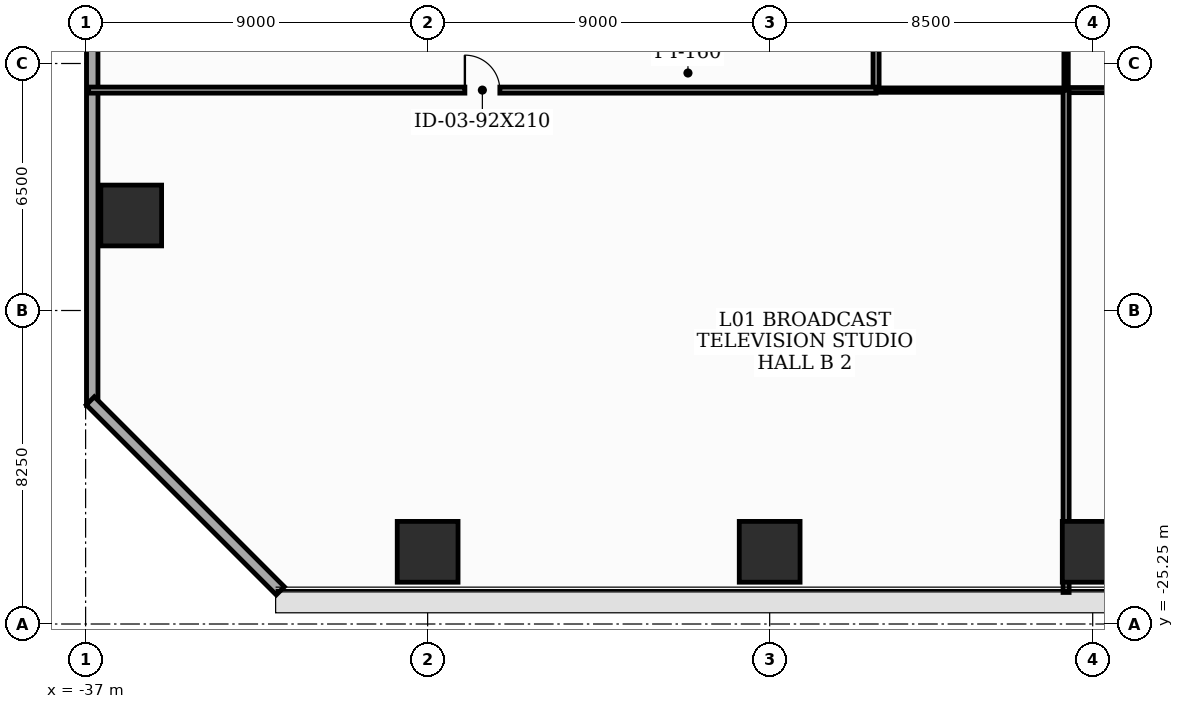
"""IFC4 building model, lengths in metres.
Left out: names, types, materials, properties, quantities, classifications, styles, units other than length and angle.
Written with IfcOpenShell. Run it as: python <this file> out.ifc"""

import sys

from ifc_helpers import new_model, si_unit, direction, frame, frame_2d, origin, origin_2d, place, context, subcontext, project, spatial, rectangle, extrude, element, fill, save


model = new_model("IFC4")
c1 = context("Model", 3, precision=1e-05, world=origin(), true_north=direction((0.0, 1.0)))
c2 = subcontext(c1, "Body", "Model", "MODEL_VIEW")
j1 = project(units=[si_unit("LENGTHUNIT", "METRE"), si_unit("PLANEANGLEUNIT", "RADIAN")], contexts=[c1])
p1 = place(None, origin())
s1 = spatial("IfcSite", under=j1, at=p1, CompositionType="ELEMENT")
p2 = place(p1, origin())
s2 = spatial("IfcBuilding", under=s1, at=p2, CompositionType="ELEMENT")
p3 = place(p2, frame((0.0, 0.0, 5.2)))
s3 = spatial("IfcBuildingStorey", under=s2, at=p3, CompositionType="ELEMENT", Elevation=5.2)
for number, where, z_axis, x_axis in (
    (1, (-28.0, -23.35, 0.0), (0.0, 0.0, 1.0), (1.0, 0.0, 0.0)),
    (2, (-19.0, -23.35, 0.0), (0.0, 0.0, 1.0), (1.0, 0.0, 0.0)),
    (3, (-10.5, -23.35, 0.0), (0.0, 0.0, 1.0), (1.0, 0.0, 0.0)),
    (4, (-35.8, -14.5, 0.0), (0.0, 0.0, 1.0), (1.0, 0.0, 0.0)),
):
    element("IfcColumn", number, at=place(p3, frame(where, z_axis=z_axis, x_axis=x_axis)), inside=s3, PredefinedType="COLUMN", context=c2, shape_type="SweptSolid", body=[
        extrude(rectangle(XDim=1.6, YDim=1.6, at=origin_2d()), origin(), (0.0, 0.0, 1.0), 5.2),
    ])
p4 = place(p3, frame((-36.825, 28.5, 0.0), z_axis=(0.0, 0.0, 1.0), x_axis=(0.0, -1.0, 0.0)))
e5 = element("IfcWall", 5, at=p4, inside=s3, PredefinedType="SOLIDWALL", context=c2, shape_type="SweptSolid", body=[
    extrude(rectangle(XDim=48.0, YDim=0.3, at=frame_2d((24.0, 0.0))), origin(), (0.0, 0.0, 1.0), 4.95),
])
p5 = place(p4, frame((6.2, 0.0, 0.9)))
e6 = element("IfcOpeningElement", 6, at=p5, cuts=e5, PredefinedType="OPENING", context=c2, shape_type="SweptSolid", body=[
    extrude(rectangle(XDim=2.4, YDim=1.35, at=frame_2d((1.2, 0.675))), frame((0.0, 0.16, 0.0), z_axis=(0.0, -1.0, 0.0), x_axis=(1.0, 0.0, 0.0)), (0.0, 0.0, 1.0), 0.32),
])
p6 = place(p4, frame((19.2, 0.0, 0.9)))
e7 = element("IfcOpeningElement", 7, at=p6, cuts=e5, PredefinedType="OPENING", context=c2, shape_type="SweptSolid", body=[
    extrude(rectangle(XDim=1.8, YDim=1.35, at=frame_2d((0.9, 0.675))), frame((0.0, 0.16, 0.0), z_axis=(0.0, -1.0, 0.0), x_axis=(1.0, 0.0, 0.0)), (0.0, 0.0, 1.0), 0.32),
])
p7 = place(p4, frame((36.2, 0.0, 0.9)))
e8 = element("IfcOpeningElement", 8, at=p7, cuts=e5, PredefinedType="OPENING", context=c2, shape_type="SweptSolid", body=[
    extrude(rectangle(XDim=2.4, YDim=1.35, at=frame_2d((1.2, 0.675))), frame((0.0, 0.16, 0.0), z_axis=(0.0, -1.0, 0.0), x_axis=(1.0, 0.0, 0.0)), (0.0, 0.0, 1.0), 0.32),
])
p8 = place(p3, frame((-36.876, -19.376, 0.0), z_axis=(0.0, 0.0, 1.0), x_axis=(0.707106781187, -0.707106781187, 0.0)))
e9 = element("IfcWall", 9, at=p8, inside=s3, PredefinedType="SOLIDWALL", context=c2, shape_type="SweptSolid", body=[
    extrude(rectangle(XDim=7.071, YDim=0.3, at=frame_2d((3.536, 0.0))), origin(), (0.0, 0.0, 1.0), 4.95),
])
p9 = place(p3, frame((-11.2, -7.4, 0.0), z_axis=(0.0, 0.0, 1.0), x_axis=(0.0, -1.0, 0.0)))
e10 = element("IfcWall", 10, at=p9, inside=s3, PredefinedType="PARTITIONING", context=c2, shape_type="SweptSolid", body=[
    extrude(rectangle(XDim=3.8, YDim=0.115, at=frame_2d((1.9, 0.0))), origin(), (0.0, 0.0, 1.0), 4.95),
])
p10 = place(p9, frame((1.44, 0.0, 0.0)))
e11 = element("IfcOpeningElement", 11, at=p10, cuts=e10, PredefinedType="OPENING", context=c2, shape_type="SweptSolid", body=[
    extrude(rectangle(XDim=0.92, YDim=2.1, at=frame_2d((0.46, 1.05))), frame((0.0, 0.067, 0.0), z_axis=(0.0, -1.0, 0.0), x_axis=(1.0, 0.0, 0.0)), (0.0, 0.0, 1.0), 0.135),
])
p11 = place(p3, frame((-11.2, -11.2, 0.0), z_axis=(0.0, 0.0, 1.0), x_axis=(1.0, 0.0, 0.0)))
e12 = element("IfcWall", 12, at=p11, inside=s3, PredefinedType="PARTITIONING", context=c2, shape_type="SweptSolid", body=[
    extrude(rectangle(XDim=22.4, YDim=0.135, at=frame_2d((11.2, 0.0))), origin(), (0.0, 0.0, 1.0), 3.435),
])
p12 = place(p11, frame((8.037, 0.0, 0.0)))
e13 = element("IfcOpeningElement", 13, at=p12, cuts=e12, PredefinedType="OPENING", context=c2, shape_type="SweptSolid", body=[
    extrude(rectangle(XDim=0.95, YDim=2.1, at=frame_2d((0.475, 1.05))), frame((0.0, 0.077, 0.0), z_axis=(0.0, -1.0, 0.0), x_axis=(1.0, 0.0, 0.0)), (0.0, 0.0, 1.0), 0.155),
])
p13 = place(p3, frame((-16.2, -11.2, 0.0), z_axis=(0.0, 0.0, 1.0), x_axis=(0.0, 1.0, 0.0)))
e14 = element("IfcWall", 14, at=p13, inside=s3, PredefinedType="PARTITIONING", context=c2, shape_type="SweptSolid", body=[
    extrude(rectangle(XDim=3.8, YDim=0.16, at=frame_2d((1.9, 0.0))), origin(), (0.0, 0.0, 1.0), 4.95),
])
p14 = place(p3, frame((-36.92, -11.2, 0.0), z_axis=(0.0, 0.0, 1.0), x_axis=(1.0, 0.0, 0.0)))
e15 = element("IfcWall", 15, at=p14, inside=s3, PredefinedType="PARTITIONING", context=c2, shape_type="SweptSolid", body=[
    extrude(rectangle(XDim=20.72, YDim=0.16, at=frame_2d((10.36, 0.0))), origin(), (0.0, 0.0, 1.0), 3.435),
])
p15 = place(p14, frame((9.9, 0.0, 0.0)))
e16 = element("IfcOpeningElement", 16, at=p15, cuts=e15, PredefinedType="OPENING", context=c2, shape_type="SweptSolid", body=[
    extrude(rectangle(XDim=0.92, YDim=2.1, at=frame_2d((0.46, 1.05))), frame((0.0, 0.09, 0.0), z_axis=(0.0, -1.0, 0.0), x_axis=(1.0, 0.0, 0.0)), (0.0, 0.0, 1.0), 0.18),
])
p16 = place(p3, frame((-16.2, -11.2, 0.0), z_axis=(0.0, 0.0, 1.0), x_axis=(1.0, 0.0, 0.0)))
e17 = element("IfcWall", 17, at=p16, inside=s3, PredefinedType="PARTITIONING", context=c2, shape_type="SweptSolid", body=[
    extrude(rectangle(XDim=5.0, YDim=0.115, at=frame_2d((2.5, 0.0))), origin(), (0.0, 0.0, 1.0), 4.95),
])
p17 = place(p3, frame((-11.2, -24.42, 0.0), z_axis=(0.0, 0.0, 1.0), x_axis=(0.0, 1.0, 0.0)))
e18 = element("IfcWall", 18, at=p17, inside=s3, PredefinedType="PARTITIONING", context=c2, shape_type="SweptSolid", body=[
    extrude(rectangle(XDim=13.22, YDim=0.16, at=frame_2d((6.61, 0.0))), origin(), (0.0, 0.0, 1.0), 3.435),
])
p18 = place(p15, origin())
e19 = element("IfcDoor", 19, at=p18, inside=s3, OperationType="SINGLE_SWING_LEFT", PredefinedType="DOOR", context=c2, shape_type="SweptSolid", body=[
    extrude(rectangle(XDim=0.92, YDim=2.1, at=frame_2d((0.46, 1.05))), frame((0.0, 0.025, 0.0), z_axis=(0.0, -1.0, 0.0), x_axis=(1.0, 0.0, 0.0)), (0.0, 0.0, 1.0), 0.05),
])
fill(e16, e19)
save(model, sys.argv[1])
